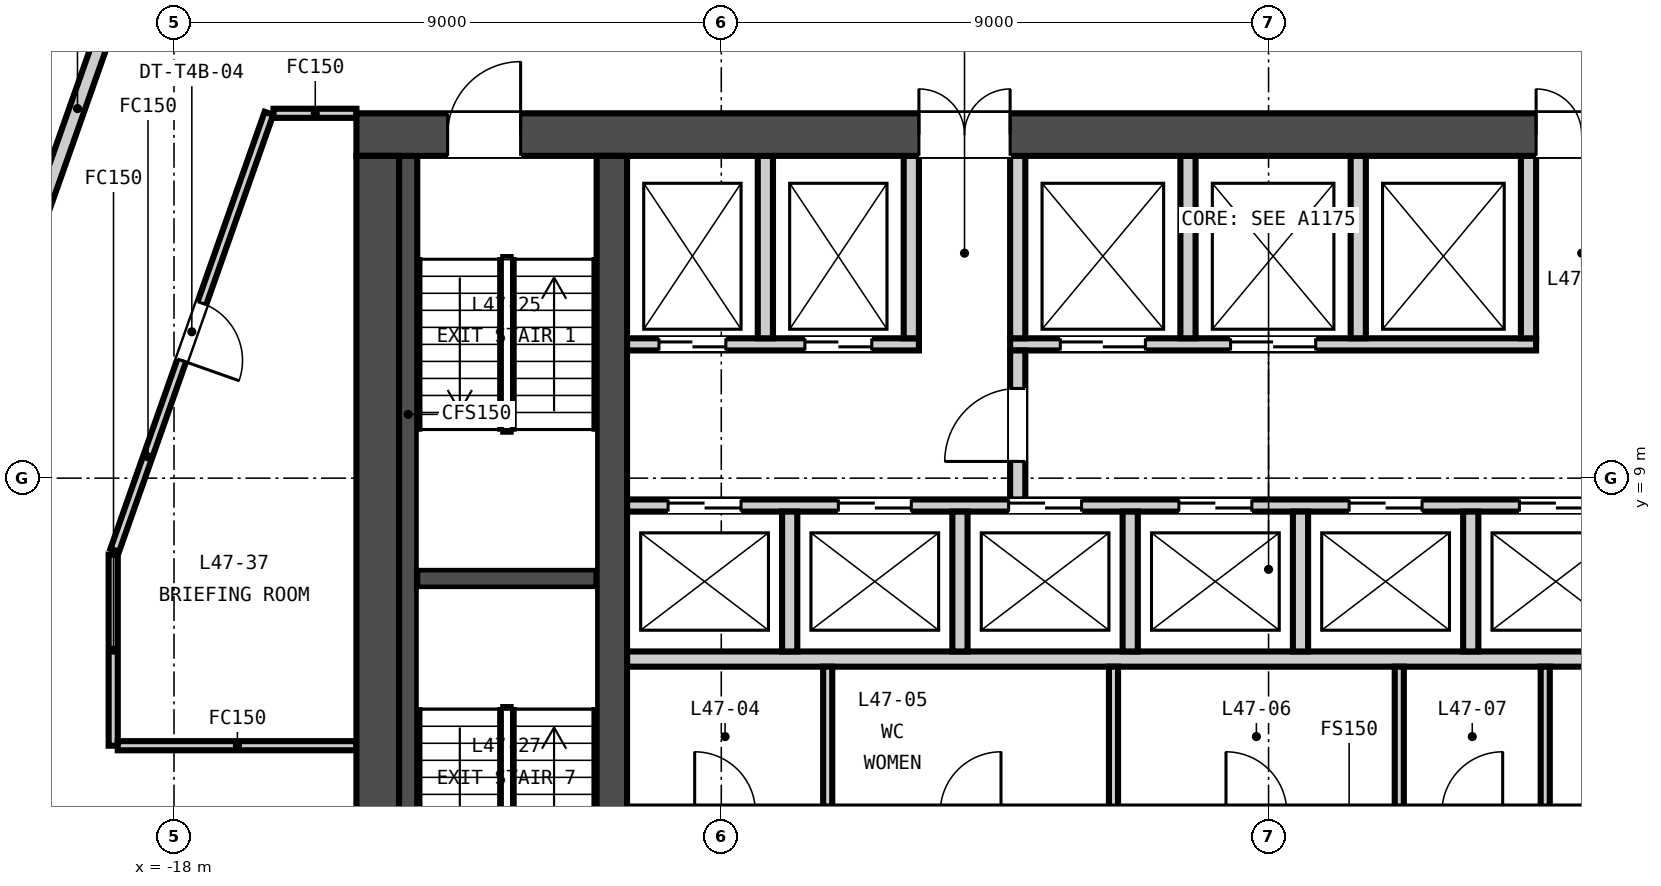
"""IFC4 building model, lengths in metres.
Left out: names, types, materials, properties, quantities, classifications, styles, units other than length and angle.
Written with IfcOpenShell. Run it as: python <this file> out.ifc"""

import sys

from ifc_helpers import new_model, si_unit, direction, frame, frame_2d, origin, place, context, subcontext, project, spatial, rectangle, extrude, element, fill, save


model = new_model("IFC4")
c1 = context("Model", 3, precision=1e-05, world=origin(), true_north=direction((0.0, 1.0)))
c2 = subcontext(c1, "Body", "Model", "MODEL_VIEW")
j1 = project(units=[si_unit("LENGTHUNIT", "METRE"), si_unit("PLANEANGLEUNIT", "RADIAN")], contexts=[c1])
p1 = place(None, origin())
s1 = spatial("IfcSite", under=j1, at=p1, CompositionType="ELEMENT")
p2 = place(p1, origin())
s2 = spatial("IfcBuilding", under=s1, at=p2, CompositionType="ELEMENT")
p3 = place(p2, frame((0.0, 0.0, 189.05)))
s3 = spatial("IfcBuildingStorey", under=s2, at=p3, CompositionType="ELEMENT", Elevation=189.05)
p4 = place(p3, frame((-15.0, 14.65, -0.15), z_axis=(0.0, 0.0, 1.0), x_axis=(1.0, 0.0, 0.0)))
e1 = element("IfcWall", 1, at=p4, inside=s3, PredefinedType="SOLIDWALL", context=c2, shape_type="SweptSolid", body=[
    extrude(rectangle(XDim=30.0, YDim=0.7, at=frame_2d((15.0, 0.0))), origin(), (0.0, 0.0, 1.0), 3.65),
])
p5 = place(p4, frame((9.25, 0.0, 0.15)))
e2 = element("IfcOpeningElement", 2, at=p5, cuts=e1, PredefinedType="OPENING", context=c2, shape_type="SweptSolid", body=[
    extrude(rectangle(XDim=1.5, YDim=2.1, at=frame_2d((0.75, 1.05))), frame((0.0, 0.36, 0.0), z_axis=(0.0, -1.0, 0.0), x_axis=(1.0, 0.0, 0.0)), (0.0, 0.0, 1.0), 0.72),
])
p6 = place(p4, frame((19.4, 0.0, 0.15)))
e3 = element("IfcOpeningElement", 3, at=p6, cuts=e1, PredefinedType="OPENING", context=c2, shape_type="SweptSolid", body=[
    extrude(rectangle(XDim=1.5, YDim=2.1, at=frame_2d((0.75, 1.05))), frame((0.0, 0.36, 0.0), z_axis=(0.0, -1.0, 0.0), x_axis=(1.0, 0.0, 0.0)), (0.0, 0.0, 1.0), 0.72),
])
p7 = place(p4, frame((1.5, 0.0, 0.15)))
e4 = element("IfcOpeningElement", 4, at=p7, cuts=e1, PredefinedType="OPENING", context=c2, shape_type="SweptSolid", body=[
    extrude(rectangle(XDim=1.2, YDim=2.1, at=frame_2d((0.6, 1.05))), frame((0.0, 0.36, 0.0), z_axis=(0.0, -1.0, 0.0), x_axis=(1.0, 0.0, 0.0)), (0.0, 0.0, 1.0), 0.72),
])
p8 = place(p4, frame((27.3, 0.0, 0.15)))
e5 = element("IfcOpeningElement", 5, at=p8, cuts=e1, PredefinedType="OPENING", context=c2, shape_type="SweptSolid", body=[
    extrude(rectangle(XDim=1.2, YDim=2.1, at=frame_2d((0.6, 1.05))), frame((0.0, 0.36, 0.0), z_axis=(0.0, -1.0, 0.0), x_axis=(1.0, 0.0, 0.0)), (0.0, 0.0, 1.0), 0.72),
])
p9 = place(p3, frame((-14.65, 0.7, -0.15), z_axis=(0.0, 0.0, 1.0), x_axis=(0.0, 1.0, 0.0)))
e6 = element("IfcWall", 6, at=p9, inside=s3, PredefinedType="SOLIDWALL", context=c2, shape_type="SweptSolid", body=[
    extrude(rectangle(XDim=13.6, YDim=0.7, at=frame_2d((6.8, 0.0))), origin(), (0.0, 0.0, 1.0), 3.65),
])
p10 = place(p3, frame((-10.8, 0.7, -0.15), z_axis=(0.0, 0.0, 1.0), x_axis=(0.0, 1.0, 0.0)))
e7 = element("IfcWall", 7, at=p10, inside=s3, PredefinedType="SOLIDWALL", context=c2, shape_type="SweptSolid", body=[
    extrude(rectangle(XDim=13.6, YDim=0.5, at=frame_2d((6.8, 0.0))), origin(), (0.0, 0.0, 1.0), 3.65),
])
p11 = place(p3, frame((-10.55, 6.025, 0.0), z_axis=(0.0, 0.0, 1.0), x_axis=(1.0, 0.0, 0.0)))
e8 = element("IfcWall", 8, at=p11, inside=s3, PredefinedType="PARTITIONING", context=c2, shape_type="SweptSolid", body=[
    extrude(rectangle(XDim=21.1, YDim=0.25, at=frame_2d((10.55, 0.0))), origin(), (0.0, 0.0, 1.0), 3.5),
])
p12 = place(p3, frame((-10.55, 8.55, 0.0), z_axis=(0.0, 0.0, 1.0), x_axis=(1.0, 0.0, 0.0)))
e9 = element("IfcWall", 9, at=p12, inside=s3, PredefinedType="PARTITIONING", context=c2, shape_type="SweptSolid", body=[
    extrude(rectangle(XDim=21.1, YDim=0.2, at=frame_2d((10.55, 0.0))), origin(), (0.0, 0.0, 1.0), 3.5),
])
p13 = place(p12, frame((0.675, 0.0, 0.0)))
e10 = element("IfcOpeningElement", 10, at=p13, cuts=e9, PredefinedType="OPENING", context=c2, shape_type="SweptSolid", body=[
    extrude(rectangle(XDim=1.2, YDim=2.1, at=frame_2d((0.6, 1.05))), frame((0.0, 0.11, 0.0), z_axis=(0.0, -1.0, 0.0), x_axis=(1.0, 0.0, 0.0)), (0.0, 0.0, 1.0), 0.22),
])
p14 = place(p12, frame((3.475, 0.0, 0.0)))
e11 = element("IfcOpeningElement", 11, at=p14, cuts=e9, PredefinedType="OPENING", context=c2, shape_type="SweptSolid", body=[
    extrude(rectangle(XDim=1.2, YDim=2.1, at=frame_2d((0.6, 1.05))), frame((0.0, 0.11, 0.0), z_axis=(0.0, -1.0, 0.0), x_axis=(1.0, 0.0, 0.0)), (0.0, 0.0, 1.0), 0.22),
])
p15 = place(p12, frame((6.275, 0.0, 0.0)))
e12 = element("IfcOpeningElement", 12, at=p15, cuts=e9, PredefinedType="OPENING", context=c2, shape_type="SweptSolid", body=[
    extrude(rectangle(XDim=1.2, YDim=2.1, at=frame_2d((0.6, 1.05))), frame((0.0, 0.11, 0.0), z_axis=(0.0, -1.0, 0.0), x_axis=(1.0, 0.0, 0.0)), (0.0, 0.0, 1.0), 0.22),
])
p16 = place(p12, frame((9.075, 0.0, 0.0)))
e13 = element("IfcOpeningElement", 13, at=p16, cuts=e9, PredefinedType="OPENING", context=c2, shape_type="SweptSolid", body=[
    extrude(rectangle(XDim=1.2, YDim=2.1, at=frame_2d((0.6, 1.05))), frame((0.0, 0.11, 0.0), z_axis=(0.0, -1.0, 0.0), x_axis=(1.0, 0.0, 0.0)), (0.0, 0.0, 1.0), 0.22),
])
p17 = place(p12, frame((11.875, 0.0, 0.0)))
e14 = element("IfcOpeningElement", 14, at=p17, cuts=e9, PredefinedType="OPENING", context=c2, shape_type="SweptSolid", body=[
    extrude(rectangle(XDim=1.2, YDim=2.1, at=frame_2d((0.6, 1.05))), frame((0.0, 0.11, 0.0), z_axis=(0.0, -1.0, 0.0), x_axis=(1.0, 0.0, 0.0)), (0.0, 0.0, 1.0), 0.22),
])
p18 = place(p12, frame((14.675, 0.0, 0.0)))
e15 = element("IfcOpeningElement", 15, at=p18, cuts=e9, PredefinedType="OPENING", context=c2, shape_type="SweptSolid", body=[
    extrude(rectangle(XDim=1.2, YDim=2.1, at=frame_2d((0.6, 1.05))), frame((0.0, 0.11, 0.0), z_axis=(0.0, -1.0, 0.0), x_axis=(1.0, 0.0, 0.0)), (0.0, 0.0, 1.0), 0.22),
])
p19 = place(p12, frame((17.475, 0.0, 0.0)))
e16 = element("IfcOpeningElement", 16, at=p19, cuts=e9, PredefinedType="OPENING", context=c2, shape_type="SweptSolid", body=[
    extrude(rectangle(XDim=1.2, YDim=2.1, at=frame_2d((0.6, 1.05))), frame((0.0, 0.11, 0.0), z_axis=(0.0, -1.0, 0.0), x_axis=(1.0, 0.0, 0.0)), (0.0, 0.0, 1.0), 0.22),
])
p20 = place(p12, frame((19.9, 0.0, 0.0)))
e17 = element("IfcOpeningElement", 17, at=p20, cuts=e9, PredefinedType="OPENING", context=c2, shape_type="SweptSolid", body=[
    extrude(rectangle(XDim=0.9, YDim=2.1, at=frame_2d((0.45, 1.05))), frame((0.0, 0.11, 0.0), z_axis=(0.0, -1.0, 0.0), x_axis=(1.0, 0.0, 0.0)), (0.0, 0.0, 1.0), 0.22),
])
p21 = place(p3, frame((-10.55, 11.2, 0.0), z_axis=(0.0, 0.0, 1.0), x_axis=(1.0, 0.0, 0.0)))
e18 = element("IfcWall", 18, at=p21, inside=s3, PredefinedType="PARTITIONING", context=c2, shape_type="SweptSolid", body=[
    extrude(rectangle(XDim=4.8, YDim=0.2, at=frame_2d((2.4, 0.0))), origin(), (0.0, 0.0, 1.0), 3.5),
])
p22 = place(p21, frame((0.525, 0.0, 0.0)))
e19 = element("IfcOpeningElement", 19, at=p22, cuts=e18, PredefinedType="OPENING", context=c2, shape_type="SweptSolid", body=[
    extrude(rectangle(XDim=1.1, YDim=2.1, at=frame_2d((0.55, 1.05))), frame((0.0, 0.11, 0.0), z_axis=(0.0, -1.0, 0.0), x_axis=(1.0, 0.0, 0.0)), (0.0, 0.0, 1.0), 0.22),
])
p23 = place(p21, frame((2.925, 0.0, 0.0)))
e20 = element("IfcOpeningElement", 20, at=p23, cuts=e18, PredefinedType="OPENING", context=c2, shape_type="SweptSolid", body=[
    extrude(rectangle(XDim=1.1, YDim=2.1, at=frame_2d((0.55, 1.05))), frame((0.0, 0.11, 0.0), z_axis=(0.0, -1.0, 0.0), x_axis=(1.0, 0.0, 0.0)), (0.0, 0.0, 1.0), 0.22),
])
p24 = place(p3, frame((-4.25, 11.2, 0.0), z_axis=(0.0, 0.0, 1.0), x_axis=(1.0, 0.0, 0.0)))
e21 = element("IfcWall", 21, at=p24, inside=s3, PredefinedType="PARTITIONING", context=c2, shape_type="SweptSolid", body=[
    extrude(rectangle(XDim=8.65, YDim=0.2, at=frame_2d((4.325, 0.0))), origin(), (0.0, 0.0, 1.0), 3.5),
])
p25 = place(p24, frame((0.825, 0.0, 0.0)))
e22 = element("IfcOpeningElement", 22, at=p25, cuts=e21, PredefinedType="OPENING", context=c2, shape_type="SweptSolid", body=[
    extrude(rectangle(XDim=1.4, YDim=2.1, at=frame_2d((0.7, 1.05))), frame((0.0, 0.11, 0.0), z_axis=(0.0, -1.0, 0.0), x_axis=(1.0, 0.0, 0.0)), (0.0, 0.0, 1.0), 0.22),
])
p26 = place(p24, frame((3.625, 0.0, 0.0)))
e23 = element("IfcOpeningElement", 23, at=p26, cuts=e21, PredefinedType="OPENING", context=c2, shape_type="SweptSolid", body=[
    extrude(rectangle(XDim=1.4, YDim=2.1, at=frame_2d((0.7, 1.05))), frame((0.0, 0.11, 0.0), z_axis=(0.0, -1.0, 0.0), x_axis=(1.0, 0.0, 0.0)), (0.0, 0.0, 1.0), 0.22),
])
p27 = place(p3, frame((-4.125, 8.65, 0.0), z_axis=(0.0, 0.0, 1.0), x_axis=(0.0, 1.0, 0.0)))
e24 = element("IfcWall", 24, at=p27, inside=s3, PredefinedType="PARTITIONING", context=c2, shape_type="SweptSolid", body=[
    extrude(rectangle(XDim=2.45, YDim=0.25, at=frame_2d((1.225, 0.0))), origin(), (0.0, 0.0, 1.0), 3.5),
])
p28 = place(p27, frame((0.625, 0.0, 0.0)))
e25 = element("IfcOpeningElement", 25, at=p28, cuts=e24, PredefinedType="OPENING", context=c2, shape_type="SweptSolid", body=[
    extrude(rectangle(XDim=1.2, YDim=2.1, at=frame_2d((0.6, 1.05))), frame((0.0, 0.135, 0.0), z_axis=(0.0, -1.0, 0.0), x_axis=(1.0, 0.0, 0.0)), (0.0, 0.0, 1.0), 0.27),
])
for number, where, z_axis, x_axis in (
    (26, (-7.25, 3.6, 0.0), (0.0, 0.0, 1.0), (0.0, 1.0, 0.0)),
    (27, (-2.55, 3.6, 0.0), (0.0, 0.0, 1.0), (0.0, 1.0, 0.0)),
    (28, (2.15, 3.6, 0.0), (0.0, 0.0, 1.0), (0.0, 1.0, 0.0)),
    (29, (4.55, 3.6, 0.0), (0.0, 0.0, 1.0), (0.0, 1.0, 0.0)),
):
    element("IfcWall", number, at=place(p3, frame(where, z_axis=z_axis, x_axis=x_axis)), inside=s3, PredefinedType="PARTITIONING", context=c2, shape_type="SweptSolid", body=[
        extrude(rectangle(XDim=2.3, YDim=0.15, at=frame_2d((1.15, 0.0))), origin(), (0.0, 0.0, 1.0), 3.5),
    ])
for number, where, z_axis, x_axis in (
    (30, (-7.875, 6.15, 0.0), (0.0, 0.0, 1.0), (0.0, 1.0, 0.0)),
    (31, (-5.075, 6.15, 0.0), (0.0, 0.0, 1.0), (0.0, 1.0, 0.0)),
    (32, (-2.275, 6.15, 0.0), (0.0, 0.0, 1.0), (0.0, 1.0, 0.0)),
    (33, (0.525, 6.15, 0.0), (0.0, 0.0, 1.0), (0.0, 1.0, 0.0)),
    (34, (3.325, 6.15, 0.0), (0.0, 0.0, 1.0), (0.0, 1.0, 0.0)),
):
    element("IfcWall", number, at=place(p3, frame(where, z_axis=z_axis, x_axis=x_axis)), inside=s3, PredefinedType="PARTITIONING", context=c2, shape_type="SweptSolid", body=[
        extrude(rectangle(XDim=2.3, YDim=0.25, at=frame_2d((1.15, 0.0))), origin(), (0.0, 0.0, 1.0), 3.5),
    ])
for number, where, z_axis, x_axis in (
    (35, (-8.275, 11.3, 0.0), (0.0, 0.0, 1.0), (0.0, 1.0, 0.0)),
    (36, (-5.875, 11.3, 0.0), (0.0, 0.0, 1.0), (0.0, 1.0, 0.0)),
    (37, (-4.125, 11.3, 0.0), (0.0, 0.0, 1.0), (0.0, 1.0, 0.0)),
    (38, (-1.325, 11.3, 0.0), (0.0, 0.0, 1.0), (0.0, 1.0, 0.0)),
    (39, (1.475, 11.3, 0.0), (0.0, 0.0, 1.0), (0.0, 1.0, 0.0)),
    (40, (4.275, 11.3, 0.0), (0.0, 0.0, 1.0), (0.0, 1.0, 0.0)),
):
    element("IfcWall", number, at=place(p3, frame(where, z_axis=z_axis, x_axis=x_axis)), inside=s3, PredefinedType="PARTITIONING", context=c2, shape_type="SweptSolid", body=[
        extrude(rectangle(XDim=3.0, YDim=0.25, at=frame_2d((1.5, 0.0))), origin(), (0.0, 0.0, 1.0), 3.5),
    ])
p29 = place(p3, frame((-14.0, 7.35, 0.0), z_axis=(0.0, 0.0, 1.0), x_axis=(1.0, 0.0, 0.0)))
e41 = element("IfcWall", 41, at=p29, inside=s3, PredefinedType="SOLIDWALL", context=c2, shape_type="SweptSolid", body=[
    extrude(rectangle(XDim=2.95, YDim=0.3, at=frame_2d((1.475, 0.0))), origin(), (0.0, 0.0, 1.0), 3.5),
])
p30 = place(p3, frame((-14.15, 0.7, 0.0), z_axis=(0.0, 0.0, 1.0), x_axis=(0.0, 1.0, 0.0)))
e42 = element("IfcWall", 42, at=p30, inside=s3, PredefinedType="SOLIDWALL", context=c2, shape_type="SweptSolid", body=[
    extrude(rectangle(XDim=13.6, YDim=0.3, at=frame_2d((6.8, 0.0))), origin(), (0.0, 0.0, 1.0), 3.5),
])
p31 = place(p3, frame((-19.0, 7.743, 0.0), z_axis=(0.0, 0.0, 1.0), x_axis=(0.0, -1.0, 0.0)))
e43 = element("IfcWall", 43, at=p31, inside=s3, PredefinedType="PARTITIONING", context=c2, shape_type="SweptSolid", body=[
    extrude(rectangle(XDim=3.143, YDim=0.15, at=frame_2d((1.571, 0.0))), origin(), (0.0, 0.0, 1.0), 2.741),
])
p32 = place(p3, frame((-16.439, 15.0, 0.0), z_axis=(0.0, 0.0, 1.0), x_axis=(-0.332796656951, -0.942998613531, 0.0)))
e44 = element("IfcWall", 44, at=p32, inside=s3, PredefinedType="PARTITIONING", context=c2, shape_type="SweptSolid", body=[
    extrude(rectangle(XDim=7.621, YDim=0.15, at=frame_2d((3.81, 0.0))), origin(), (0.0, 0.0, 1.0), 2.741),
])
p33 = place(p32, frame((3.31, 0.0, 0.0)))
e45 = element("IfcOpeningElement", 45, at=p33, cuts=e44, PredefinedType="OPENING", context=c2, shape_type="SweptSolid", body=[
    extrude(rectangle(XDim=1.0, YDim=2.1, at=frame_2d((0.5, 1.05))), frame((0.0, 0.085, 0.0), z_axis=(0.0, -1.0, 0.0), x_axis=(1.0, 0.0, 0.0)), (0.0, 0.0, 1.0), 0.17),
])
p34 = place(p3, frame((-15.0, 15.0, 0.0), z_axis=(0.0, 0.0, 1.0), x_axis=(-1.0, 0.0, 0.0)))
e46 = element("IfcWall", 46, at=p34, inside=s3, PredefinedType="PARTITIONING", context=c2, shape_type="SweptSolid", body=[
    extrude(rectangle(XDim=1.364, YDim=0.15, at=frame_2d((0.682, 0.0))), origin(), (0.0, 0.0, 1.0), 2.741),
])
p35 = place(p3, frame((-20.624, 12.156, 0.0), z_axis=(0.0, 0.0, 1.0), x_axis=(0.332877813913, 0.942969968241, 0.0)))
e47 = element("IfcWall", 47, at=p35, inside=s3, PredefinedType="PARTITIONING", context=c2, shape_type="SweptSolid", body=[
    extrude(rectangle(XDim=6.198, YDim=0.25, at=frame_2d((3.099, 0.0))), origin(), (0.0, 0.0, 1.0), 2.741),
])
p36 = place(p3, frame((-18.925, 4.6, 0.0), z_axis=(0.0, 0.0, 1.0), x_axis=(1.0, 0.0, 0.0)))
e48 = element("IfcWall", 48, at=p36, inside=s3, PredefinedType="PARTITIONING", context=c2, shape_type="SweptSolid", body=[
    extrude(rectangle(XDim=3.925, YDim=0.15, at=frame_2d((1.962, 0.0))), origin(), (0.0, 0.0, 1.0), 2.741),
])
p37 = place(p28, origin())
e49 = element("IfcDoor", 49, at=p37, inside=s3, OperationType="SINGLE_SWING_LEFT", PredefinedType="DOOR", context=c2, shape_type="SweptSolid", body=[
    extrude(rectangle(XDim=1.2, YDim=2.1, at=frame_2d((0.6, 1.05))), frame((0.0, 0.025, 0.0), z_axis=(0.0, -1.0, 0.0), x_axis=(1.0, 0.0, 0.0)), (0.0, 0.0, 1.0), 0.05),
])
fill(e25, e49)
p38 = place(p13, origin())
e50 = element("IfcDoor", 50, at=p38, inside=s3, OperationType="DOUBLE_DOOR_SLIDING", PredefinedType="DOOR", context=c2, shape_type="SweptSolid", body=[
    extrude(rectangle(XDim=1.2, YDim=2.1, at=frame_2d((0.6, 1.05))), frame((0.0, 0.025, 0.0), z_axis=(0.0, -1.0, 0.0), x_axis=(1.0, 0.0, 0.0)), (0.0, 0.0, 1.0), 0.05),
])
fill(e10, e50)
p39 = place(p14, origin())
e51 = element("IfcDoor", 51, at=p39, inside=s3, OperationType="DOUBLE_DOOR_SLIDING", PredefinedType="DOOR", context=c2, shape_type="SweptSolid", body=[
    extrude(rectangle(XDim=1.2, YDim=2.1, at=frame_2d((0.6, 1.05))), frame((0.0, 0.025, 0.0), z_axis=(0.0, -1.0, 0.0), x_axis=(1.0, 0.0, 0.0)), (0.0, 0.0, 1.0), 0.05),
])
fill(e11, e51)
p40 = place(p15, origin())
e52 = element("IfcDoor", 52, at=p40, inside=s3, OperationType="DOUBLE_DOOR_SLIDING", PredefinedType="DOOR", context=c2, shape_type="SweptSolid", body=[
    extrude(rectangle(XDim=1.2, YDim=2.1, at=frame_2d((0.6, 1.05))), frame((0.0, 0.025, 0.0), z_axis=(0.0, -1.0, 0.0), x_axis=(1.0, 0.0, 0.0)), (0.0, 0.0, 1.0), 0.05),
])
fill(e12, e52)
p41 = place(p16, origin())
e53 = element("IfcDoor", 53, at=p41, inside=s3, OperationType="DOUBLE_DOOR_SLIDING", PredefinedType="DOOR", context=c2, shape_type="SweptSolid", body=[
    extrude(rectangle(XDim=1.2, YDim=2.1, at=frame_2d((0.6, 1.05))), frame((0.0, 0.025, 0.0), z_axis=(0.0, -1.0, 0.0), x_axis=(1.0, 0.0, 0.0)), (0.0, 0.0, 1.0), 0.05),
])
fill(e13, e53)
p42 = place(p17, origin())
e54 = element("IfcDoor", 54, at=p42, inside=s3, OperationType="DOUBLE_DOOR_SLIDING", PredefinedType="DOOR", context=c2, shape_type="SweptSolid", body=[
    extrude(rectangle(XDim=1.2, YDim=2.1, at=frame_2d((0.6, 1.05))), frame((0.0, 0.025, 0.0), z_axis=(0.0, -1.0, 0.0), x_axis=(1.0, 0.0, 0.0)), (0.0, 0.0, 1.0), 0.05),
])
fill(e14, e54)
p43 = place(p18, origin())
e55 = element("IfcDoor", 55, at=p43, inside=s3, OperationType="DOUBLE_DOOR_SLIDING", PredefinedType="DOOR", context=c2, shape_type="SweptSolid", body=[
    extrude(rectangle(XDim=1.2, YDim=2.1, at=frame_2d((0.6, 1.05))), frame((0.0, 0.025, 0.0), z_axis=(0.0, -1.0, 0.0), x_axis=(1.0, 0.0, 0.0)), (0.0, 0.0, 1.0), 0.05),
])
fill(e15, e55)
p44 = place(p22, origin())
e56 = element("IfcDoor", 56, at=p44, inside=s3, OperationType="DOUBLE_DOOR_SLIDING", PredefinedType="DOOR", context=c2, shape_type="SweptSolid", body=[
    extrude(rectangle(XDim=1.1, YDim=2.1, at=frame_2d((0.55, 1.05))), frame((0.0, 0.025, 0.0), z_axis=(0.0, -1.0, 0.0), x_axis=(1.0, 0.0, 0.0)), (0.0, 0.0, 1.0), 0.05),
])
fill(e19, e56)
p45 = place(p23, origin())
e57 = element("IfcDoor", 57, at=p45, inside=s3, OperationType="DOUBLE_DOOR_SLIDING", PredefinedType="DOOR", context=c2, shape_type="SweptSolid", body=[
    extrude(rectangle(XDim=1.1, YDim=2.1, at=frame_2d((0.55, 1.05))), frame((0.0, 0.025, 0.0), z_axis=(0.0, -1.0, 0.0), x_axis=(1.0, 0.0, 0.0)), (0.0, 0.0, 1.0), 0.05),
])
fill(e20, e57)
p46 = place(p25, origin())
e58 = element("IfcDoor", 58, at=p46, inside=s3, OperationType="DOUBLE_DOOR_SLIDING", PredefinedType="DOOR", context=c2, shape_type="SweptSolid", body=[
    extrude(rectangle(XDim=1.4, YDim=2.1, at=frame_2d((0.7, 1.05))), frame((0.0, 0.025, 0.0), z_axis=(0.0, -1.0, 0.0), x_axis=(1.0, 0.0, 0.0)), (0.0, 0.0, 1.0), 0.05),
])
fill(e22, e58)
p47 = place(p26, origin())
e59 = element("IfcDoor", 59, at=p47, inside=s3, OperationType="DOUBLE_DOOR_SLIDING", PredefinedType="DOOR", context=c2, shape_type="SweptSolid", body=[
    extrude(rectangle(XDim=1.4, YDim=2.1, at=frame_2d((0.7, 1.05))), frame((0.0, 0.025, 0.0), z_axis=(0.0, -1.0, 0.0), x_axis=(1.0, 0.0, 0.0)), (0.0, 0.0, 1.0), 0.05),
])
fill(e23, e59)
p48 = place(p5, origin())
e60 = element("IfcDoor", 60, at=p48, inside=s3, OperationType="DOUBLE_DOOR_SINGLE_SWING", PredefinedType="DOOR", context=c2, shape_type="SweptSolid", body=[
    extrude(rectangle(XDim=1.5, YDim=2.1, at=frame_2d((0.75, 1.05))), frame((0.0, 0.025, 0.0), z_axis=(0.0, -1.0, 0.0), x_axis=(1.0, 0.0, 0.0)), (0.0, 0.0, 1.0), 0.05),
])
fill(e2, e60)
p49 = place(p6, origin())
e61 = element("IfcDoor", 61, at=p49, inside=s3, OperationType="DOUBLE_DOOR_SINGLE_SWING", PredefinedType="DOOR", context=c2, shape_type="SweptSolid", body=[
    extrude(rectangle(XDim=1.5, YDim=2.1, at=frame_2d((0.75, 1.05))), frame((0.0, 0.025, 0.0), z_axis=(0.0, -1.0, 0.0), x_axis=(1.0, 0.0, 0.0)), (0.0, 0.0, 1.0), 0.05),
])
fill(e3, e61)
p50 = place(p7, origin())
e62 = element("IfcDoor", 62, at=p50, inside=s3, OperationType="SINGLE_SWING_RIGHT", PredefinedType="DOOR", context=c2, shape_type="SweptSolid", body=[
    extrude(rectangle(XDim=1.2, YDim=2.1, at=frame_2d((0.6, 1.05))), frame((0.0, 0.025, 0.0), z_axis=(0.0, -1.0, 0.0), x_axis=(1.0, 0.0, 0.0)), (0.0, 0.0, 1.0), 0.05),
])
fill(e4, e62)
p51 = place(p33, origin())
e63 = element("IfcDoor", 63, at=p51, inside=s3, OperationType="SINGLE_SWING_RIGHT", PredefinedType="DOOR", context=c2, shape_type="SweptSolid", body=[
    extrude(rectangle(XDim=1.0, YDim=2.1, at=frame_2d((0.5, 1.05))), frame((0.0, 0.025, 0.0), z_axis=(0.0, -1.0, 0.0), x_axis=(1.0, 0.0, 0.0)), (0.0, 0.0, 1.0), 0.05),
])
fill(e45, e63)
save(model, sys.argv[1])
